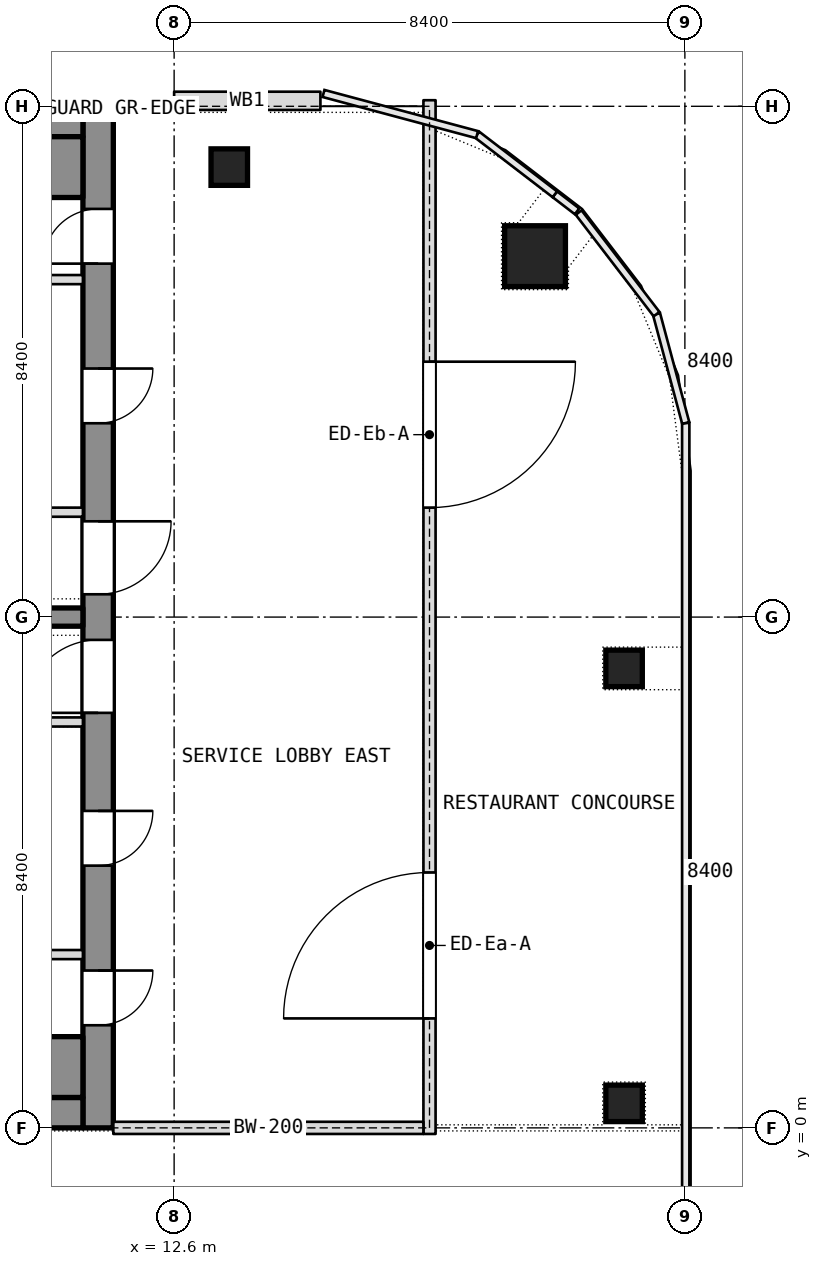
"""IFC4 building model, lengths in metres.
Left out: names, types, materials, properties, quantities, classifications, styles, units other than length and angle.
Written with IfcOpenShell. Run it as: python <this file> out.ifc"""

import sys

from ifc_helpers import new_model, si_unit, direction, frame, frame_2d, origin, origin_2d, place, context, subcontext, project, spatial, rectangle, extrude, element, fill, save


model = new_model("IFC4")
c1 = context("Model", 3, precision=1e-05, world=origin(), true_north=direction((0.0, 1.0)))
c2 = subcontext(c1, "Body", "Model", "MODEL_VIEW")
j1 = project(units=[si_unit("LENGTHUNIT", "METRE"), si_unit("PLANEANGLEUNIT", "RADIAN")], contexts=[c1])
p1 = place(None, origin())
s1 = spatial("IfcSite", under=j1, at=p1, CompositionType="ELEMENT")
p2 = place(p1, origin())
s2 = spatial("IfcBuilding", under=s1, at=p2, CompositionType="ELEMENT")
p3 = place(p2, frame((0.0, 0.0, 288.5)))
s3 = spatial("IfcBuildingStorey", under=s2, at=p3, CompositionType="ELEMENT", Elevation=288.5)
p4 = place(p3, frame((11.35, 0.0, 0.0), z_axis=(0.0, 0.0, 1.0), x_axis=(0.0, 1.0, 0.0)))
e1 = element("IfcWall", 1, at=p4, inside=s3, PredefinedType="SHEAR", context=c2, shape_type="SweptSolid", body=[
    extrude(rectangle(XDim=16.8, YDim=0.5, at=frame_2d((8.4, 0.0))), origin(), (0.0, 0.0, 1.0), 7.2),
])
p5 = place(p4, frame((1.688, 0.0, 0.0)))
e2 = element("IfcOpeningElement", 2, at=p5, cuts=e1, PredefinedType="OPENING", context=c2, shape_type="SweptSolid", body=[
    extrude(rectangle(XDim=0.9, YDim=2.1, at=frame_2d((0.45, 1.05))), frame((0.0, 0.25, 0.0), z_axis=(0.0, -1.0, 0.0), x_axis=(1.0, 0.0, 0.0)), (0.0, 0.0, 1.0), 0.5),
])
p6 = place(p4, frame((4.312, 0.0, 0.0)))
e3 = element("IfcOpeningElement", 3, at=p6, cuts=e1, PredefinedType="OPENING", context=c2, shape_type="SweptSolid", body=[
    extrude(rectangle(XDim=0.9, YDim=2.1, at=frame_2d((0.45, 1.05))), frame((0.0, 0.25, 0.0), z_axis=(0.0, -1.0, 0.0), x_axis=(1.0, 0.0, 0.0)), (0.0, 0.0, 1.0), 0.5),
])
p7 = place(p4, frame((6.825, 0.0, 0.0)))
e4 = element("IfcOpeningElement", 4, at=p7, cuts=e1, PredefinedType="OPENING", context=c2, shape_type="SweptSolid", body=[
    extrude(rectangle(XDim=1.2, YDim=2.1, at=frame_2d((0.6, 1.05))), frame((0.0, 0.25, 0.0), z_axis=(0.0, -1.0, 0.0), x_axis=(1.0, 0.0, 0.0)), (0.0, 0.0, 1.0), 0.5),
])
p8 = place(p4, frame((14.212, 0.0, 0.0)))
e5 = element("IfcOpeningElement", 5, at=p8, cuts=e1, PredefinedType="OPENING", context=c2, shape_type="SweptSolid", body=[
    extrude(rectangle(XDim=0.9, YDim=2.1, at=frame_2d((0.45, 1.05))), frame((0.0, 0.25, 0.0), z_axis=(0.0, -1.0, 0.0), x_axis=(1.0, 0.0, 0.0)), (0.0, 0.0, 1.0), 0.5),
])
p9 = place(p4, frame((11.587, 0.0, 0.0)))
e6 = element("IfcOpeningElement", 6, at=p9, cuts=e1, PredefinedType="OPENING", context=c2, shape_type="SweptSolid", body=[
    extrude(rectangle(XDim=0.9, YDim=2.1, at=frame_2d((0.45, 1.05))), frame((0.0, 0.25, 0.0), z_axis=(0.0, -1.0, 0.0), x_axis=(1.0, 0.0, 0.0)), (0.0, 0.0, 1.0), 0.5),
])
p10 = place(p4, frame((8.775, 0.0, 0.0)))
e7 = element("IfcOpeningElement", 7, at=p10, cuts=e1, PredefinedType="OPENING", context=c2, shape_type="SweptSolid", body=[
    extrude(rectangle(XDim=1.2, YDim=2.1, at=frame_2d((0.6, 1.05))), frame((0.0, 0.25, 0.0), z_axis=(0.0, -1.0, 0.0), x_axis=(1.0, 0.0, 0.0)), (0.0, 0.0, 1.0), 0.5),
])
for number, where, z_axis, x_axis in (
    (8, (-11.1, 0.25, 0.0), (0.0, 0.0, 1.0), (1.0, 0.0, 0.0)),
    (9, (-11.1, 16.55, 0.0), (0.0, 0.0, 1.0), (1.0, 0.0, 0.0)),
):
    element("IfcWall", number, at=place(p3, frame(where, z_axis=z_axis, x_axis=x_axis)), inside=s3, PredefinedType="SHEAR", context=c2, shape_type="SweptSolid", body=[
        extrude(rectangle(XDim=22.2, YDim=0.5, at=frame_2d((11.1, 0.0))), origin(), (0.0, 0.0, 1.0), 7.2),
    ])
p11 = place(p3, frame((4.35, 8.4, 0.0), z_axis=(0.0, 0.0, 1.0), x_axis=(1.0, 0.0, 0.0)))
e10 = element("IfcWall", 10, at=p11, inside=s3, PredefinedType="SHEAR", context=c2, shape_type="SweptSolid", body=[
    extrude(rectangle(XDim=6.75, YDim=0.3, at=frame_2d((3.375, 0.0))), origin(), (0.0, 0.0, 1.0), 7.2),
])
p12 = place(p3, frame((18.535, 14.335, 0.0), z_axis=(0.0, 0.0, 1.0), x_axis=(1.0, 0.0, 0.0)))
e11 = element("IfcColumn", 11, at=p12, inside=s3, PredefinedType="COLUMN", context=c2, shape_type="SweptSolid", body=[
    extrude(rectangle(XDim=1.0, YDim=1.0, at=origin_2d()), origin(), (0.0, 0.0, 1.0), 6.9),
])
for number, where, z_axis, x_axis in (
    (12, (13.507, 15.8, 0.0), (0.0, 0.0, 1.0), (1.0, 0.0, 0.0)),
    (13, (20.0, 7.556, 0.0), (0.0, 0.0, 1.0), (1.0, 0.0, 0.0)),
    (14, (20.0, 0.403, 0.0), (0.0, 0.0, 1.0), (1.0, 0.0, 0.0)),
):
    element("IfcColumn", number, at=place(p3, frame(where, z_axis=z_axis, x_axis=x_axis)), inside=s3, PredefinedType="COLUMN", context=c2, shape_type="SweptSolid", body=[
        extrude(rectangle(XDim=0.6, YDim=0.6, at=origin_2d()), origin(), (0.0, 0.0, 1.0), 6.9),
    ])
p13 = place(p3, frame((15.006, 16.89, 0.0), z_axis=(0.0, 0.0, 1.0), x_axis=(-1.0, 0.0, 0.0)))
e15 = element("IfcWall", 15, at=p13, inside=s3, PredefinedType="NOTDEFINED", context=c2, shape_type="SweptSolid", body=[
    extrude(rectangle(XDim=2.406, YDim=0.3, at=frame_2d((1.203, 0.0))), origin(), (0.0, 0.0, 1.0), 7.2),
])
for number, where, z_axis, x_axis in (
    (16, (-11.1, 1.0, 0.0), (0.0, 0.0, 1.0), (1.0, 0.0, 0.0)),
    (17, (-11.1, 15.8, 0.0), (0.0, 0.0, 1.0), (1.0, 0.0, 0.0)),
):
    element("IfcWall", number, at=place(p3, frame(where, z_axis=z_axis, x_axis=x_axis)), inside=s3, PredefinedType="PARTITIONING", context=c2, shape_type="SweptSolid", body=[
        extrude(rectangle(XDim=22.2, YDim=1.0, at=frame_2d((11.1, 0.0))), origin(), (0.0, 0.0, 1.0), 6.9),
    ])
for number, where, z_axis, x_axis in (
    (18, (9.0, 6.675, 0.0), (0.0, 0.0, 1.0), (1.0, 0.0, 0.0)),
    (19, (9.0, 2.85, 0.0), (0.0, 0.0, 1.0), (1.0, 0.0, 0.0)),
    (20, (9.0, 10.125, 0.0), (0.0, 0.0, 1.0), (1.0, 0.0, 0.0)),
    (21, (9.0, 13.95, 0.0), (0.0, 0.0, 1.0), (1.0, 0.0, 0.0)),
):
    element("IfcWall", number, at=place(p3, frame(where, z_axis=z_axis, x_axis=x_axis)), inside=s3, PredefinedType="PARTITIONING", context=c2, shape_type="SweptSolid", body=[
        extrude(rectangle(XDim=2.1, YDim=0.15, at=frame_2d((1.05, 0.0))), origin(), (0.0, 0.0, 1.0), 6.9),
    ])
p14 = place(p3, frame((16.8, -0.1, 0.0), z_axis=(0.0, 0.0, 1.0), x_axis=(0.0, 1.0, 0.0)))
e22 = element("IfcWall", 22, at=p14, inside=s3, PredefinedType="PARTITIONING", context=c2, shape_type="SweptSolid", body=[
    extrude(rectangle(XDim=17.0, YDim=0.2, at=frame_2d((8.5, 0.0))), origin(), (0.0, 0.0, 1.0), 6.9),
])
p15 = place(p14, frame((1.9, 0.0, 0.0)))
e23 = element("IfcOpeningElement", 23, at=p15, cuts=e22, PredefinedType="OPENING", context=c2, shape_type="SweptSolid", body=[
    extrude(rectangle(XDim=2.4, YDim=2.1, at=frame_2d((1.2, 1.05))), frame((0.0, 0.1, 0.0), z_axis=(0.0, -1.0, 0.0), x_axis=(1.0, 0.0, 0.0)), (0.0, 0.0, 1.0), 0.2),
])
p16 = place(p14, frame((10.3, 0.0, 0.0)))
e24 = element("IfcOpeningElement", 24, at=p16, cuts=e22, PredefinedType="OPENING", context=c2, shape_type="SweptSolid", body=[
    extrude(rectangle(XDim=2.4, YDim=2.1, at=frame_2d((1.2, 1.05))), frame((0.0, 0.1, 0.0), z_axis=(0.0, -1.0, 0.0), x_axis=(1.0, 0.0, 0.0)), (0.0, 0.0, 1.0), 0.2),
])
p17 = place(p3, frame((11.6, 0.0, 0.0), z_axis=(0.0, 0.0, 1.0), x_axis=(1.0, 0.0, 0.0)))
e25 = element("IfcWall", 25, at=p17, inside=s3, PredefinedType="PARTITIONING", context=c2, shape_type="SweptSolid", body=[
    extrude(rectangle(XDim=5.1, YDim=0.2, at=frame_2d((2.55, 0.0))), origin(), (0.0, 0.0, 1.0), 6.56),
])
p18 = place(p5, origin())
e26 = element("IfcDoor", 26, at=p18, inside=s3, OperationType="SINGLE_SWING_LEFT", PredefinedType="DOOR", context=c2, shape_type="SweptSolid", body=[
    extrude(rectangle(XDim=0.9, YDim=2.1, at=frame_2d((0.45, 1.05))), frame((0.0, 0.025, 0.0), z_axis=(0.0, -1.0, 0.0), x_axis=(1.0, 0.0, 0.0)), (0.0, 0.0, 1.0), 0.05),
])
fill(e2, e26)
p19 = place(p6, origin())
e27 = element("IfcDoor", 27, at=p19, inside=s3, OperationType="SINGLE_SWING_LEFT", PredefinedType="DOOR", context=c2, shape_type="SweptSolid", body=[
    extrude(rectangle(XDim=0.9, YDim=2.1, at=frame_2d((0.45, 1.05))), frame((0.0, 0.025, 0.0), z_axis=(0.0, -1.0, 0.0), x_axis=(1.0, 0.0, 0.0)), (0.0, 0.0, 1.0), 0.05),
])
fill(e3, e27)
p20 = place(p7, origin())
e28 = element("IfcDoor", 28, at=p20, inside=s3, OperationType="SINGLE_SWING_LEFT", PredefinedType="DOOR", context=c2, shape_type="SweptSolid", body=[
    extrude(rectangle(XDim=1.2, YDim=2.1, at=frame_2d((0.6, 1.05))), frame((0.0, 0.025, 0.0), z_axis=(0.0, -1.0, 0.0), x_axis=(1.0, 0.0, 0.0)), (0.0, 0.0, 1.0), 0.05),
])
fill(e4, e28)
p21 = place(p8, origin())
e29 = element("IfcDoor", 29, at=p21, inside=s3, OperationType="SINGLE_SWING_LEFT", PredefinedType="DOOR", context=c2, shape_type="SweptSolid", body=[
    extrude(rectangle(XDim=0.9, YDim=2.1, at=frame_2d((0.45, 1.05))), frame((0.0, 0.025, 0.0), z_axis=(0.0, -1.0, 0.0), x_axis=(1.0, 0.0, 0.0)), (0.0, 0.0, 1.0), 0.05),
])
fill(e5, e29)
p22 = place(p9, origin())
e30 = element("IfcDoor", 30, at=p22, inside=s3, OperationType="SINGLE_SWING_LEFT", PredefinedType="DOOR", context=c2, shape_type="SweptSolid", body=[
    extrude(rectangle(XDim=0.9, YDim=2.1, at=frame_2d((0.45, 1.05))), frame((0.0, 0.025, 0.0), z_axis=(0.0, -1.0, 0.0), x_axis=(1.0, 0.0, 0.0)), (0.0, 0.0, 1.0), 0.05),
])
fill(e6, e30)
p23 = place(p10, origin())
e31 = element("IfcDoor", 31, at=p23, inside=s3, OperationType="SINGLE_SWING_LEFT", PredefinedType="DOOR", context=c2, shape_type="SweptSolid", body=[
    extrude(rectangle(XDim=1.2, YDim=2.1, at=frame_2d((0.6, 1.05))), frame((0.0, 0.025, 0.0), z_axis=(0.0, -1.0, 0.0), x_axis=(1.0, 0.0, 0.0)), (0.0, 0.0, 1.0), 0.05),
])
fill(e7, e31)
p24 = place(p15, origin())
e32 = element("IfcDoor", 32, at=p24, inside=s3, OperationType="DOUBLE_DOOR_SINGLE_SWING", PredefinedType="DOOR", context=c2, shape_type="SweptSolid", body=[
    extrude(rectangle(XDim=2.4, YDim=2.1, at=frame_2d((1.2, 1.05))), frame((0.0, 0.025, 0.0), z_axis=(0.0, -1.0, 0.0), x_axis=(1.0, 0.0, 0.0)), (0.0, 0.0, 1.0), 0.05),
])
fill(e23, e32)
p25 = place(p16, origin())
e33 = element("IfcDoor", 33, at=p25, inside=s3, OperationType="DOUBLE_DOOR_SINGLE_SWING", PredefinedType="DOOR", context=c2, shape_type="SweptSolid", body=[
    extrude(rectangle(XDim=2.4, YDim=2.1, at=frame_2d((1.2, 1.05))), frame((0.0, 0.025, 0.0), z_axis=(0.0, -1.0, 0.0), x_axis=(1.0, 0.0, 0.0)), (0.0, 0.0, 1.0), 0.05),
])
fill(e24, e33)
save(model, sys.argv[1])
